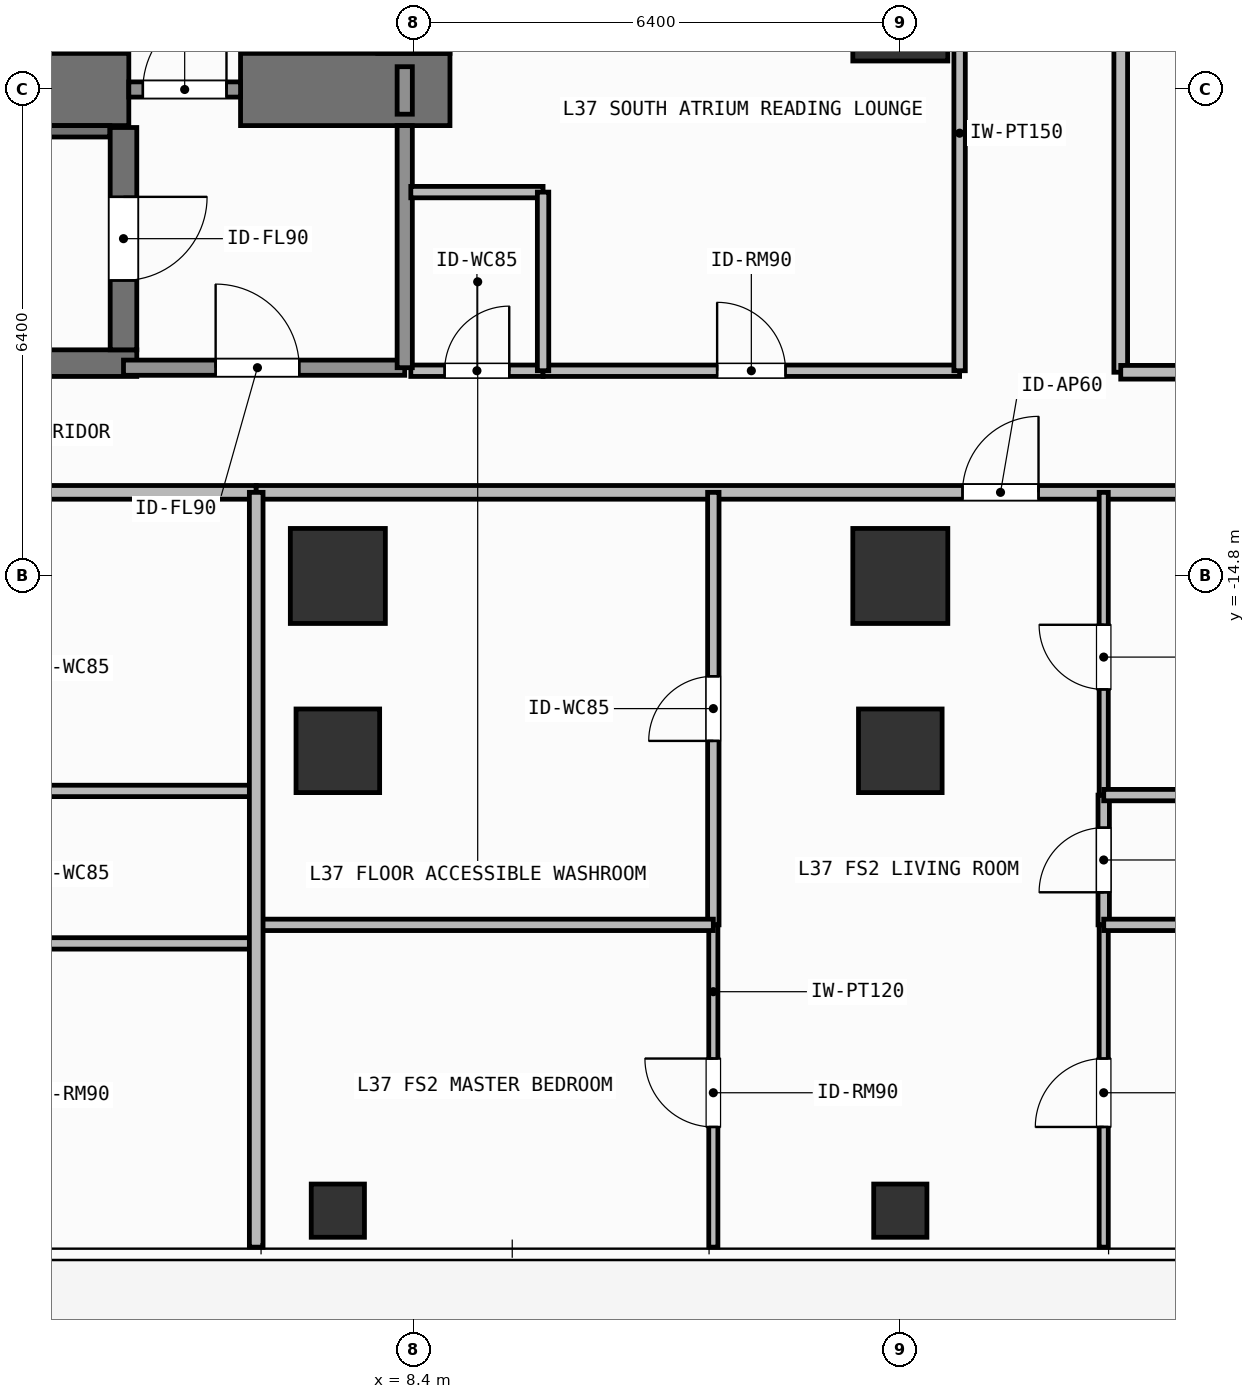
"""IFC4 building model, lengths in metres.
Left out: names, types, materials, properties, quantities, classifications, styles, units other than length and angle.
Written with IfcOpenShell. Run it as: python <this file> out.ifc"""

import sys

from ifc_helpers import new_model, si_unit, direction, frame, frame_2d, origin, origin_2d, place, context, subcontext, project, spatial, rectangle, hollow_rectangle, extrude, element, fill, save


model = new_model("IFC4")
c1 = context("Model", 3, precision=1e-05, world=origin(), true_north=direction((0.0, 1.0)))
c2 = subcontext(c1, "Body", "Model", "MODEL_VIEW")
j1 = project(units=[si_unit("LENGTHUNIT", "METRE"), si_unit("PLANEANGLEUNIT", "RADIAN")], contexts=[c1])
p1 = place(None, origin())
s1 = spatial("IfcSite", under=j1, at=p1, CompositionType="ELEMENT")
p2 = place(p1, origin())
s2 = spatial("IfcBuilding", under=s1, at=p2, CompositionType="ELEMENT")
p3 = place(p2, frame((0.0, 0.0, 148.5)))
s3 = spatial("IfcBuildingStorey", under=s2, at=p3, CompositionType="ELEMENT", Elevation=148.5)
p4 = place(p3, frame((-2.62, -8.4, 0.0), z_axis=(0.0, 0.0, 1.0), x_axis=(1.0, 0.0, 0.0)))
e1 = element("IfcWall", 1, at=p4, inside=s3, PredefinedType="SHEAR", context=c2, shape_type="SweptSolid", body=[
    extrude(rectangle(XDim=7.27, YDim=0.95, at=frame_2d((3.635, 0.0))), origin(), (0.0, 0.0, 1.0), 3.9),
])
p5 = place(p3, frame((6.12, -8.4, 0.0), z_axis=(0.0, 0.0, 1.0), x_axis=(1.0, 0.0, 0.0)))
e2 = element("IfcWall", 2, at=p5, inside=s3, PredefinedType="SHEAR", context=c2, shape_type="SweptSolid", body=[
    extrude(rectangle(XDim=2.755, YDim=0.95, at=frame_2d((1.377, 0.0))), origin(), (0.0, 0.0, 1.0), 3.9),
])
p6 = place(p3, frame((8.4, -7.925, 0.0), z_axis=(0.0, 0.0, 1.0), x_axis=(0.0, 1.0, 0.0)))
e3 = element("IfcWall", 3, at=p6, inside=s3, PredefinedType="SHEAR", context=c2, shape_type="SweptSolid", body=[
    extrude(rectangle(XDim=2.1, YDim=0.95, at=frame_2d((1.05, 0.0))), origin(), (0.0, 0.0, 1.0), 3.9),
])
p7 = place(p3, frame((-2.555, -12.0, 0.0), z_axis=(0.0, 0.0, 1.0), x_axis=(1.0, 0.0, 0.0)))
e4 = element("IfcWall", 4, at=p7, inside=s3, PredefinedType="SHEAR", context=c2, shape_type="SweptSolid", body=[
    extrude(rectangle(XDim=7.31, YDim=0.35, at=frame_2d((3.655, 0.0))), origin(), (0.0, 0.0, 1.0), 3.9),
])
p8 = place(p3, frame((-2.2, -8.95, 0.0), z_axis=(0.0, 0.0, 1.0), x_axis=(1.0, 0.0, 0.0)))
e5 = element("IfcWall", 5, at=p8, inside=s3, PredefinedType="SHEAR", context=c2, shape_type="SweptSolid", body=[
    extrude(rectangle(XDim=6.6, YDim=0.15, at=frame_2d((3.3, 0.0))), origin(), (0.0, 0.0, 1.0), 3.9),
])
p9 = place(p3, frame((4.58, -8.9, 0.0), z_axis=(0.0, 0.0, 1.0), x_axis=(0.0, -1.0, 0.0)))
e6 = element("IfcWall", 6, at=p9, inside=s3, PredefinedType="SHEAR", context=c2, shape_type="SweptSolid", body=[
    extrude(rectangle(XDim=2.925, YDim=0.35, at=frame_2d((1.462, 0.0))), origin(), (0.0, 0.0, 1.0), 3.9),
])
p10 = place(p9, frame((0.913, 0.0, 0.0)))
e7 = element("IfcOpeningElement", 7, at=p10, cuts=e6, PredefinedType="OPENING", context=c2, shape_type="SweptSolid", body=[
    extrude(rectangle(XDim=1.1, YDim=2.15, at=frame_2d((0.55, 1.075))), frame((0.0, 0.185, 0.0), z_axis=(0.0, -1.0, 0.0), x_axis=(1.0, 0.0, 0.0)), (0.0, 0.0, 1.0), 0.37),
])
for number, where, z_axis, x_axis in (
    (8, (7.4, -14.8, 0.0), (0.0, 0.0, 1.0), (1.0, 0.0, 0.0)),
    (9, (14.8, -14.8, 0.0), (0.0, 0.0, 1.0), (1.0, 0.0, 0.0)),
    (10, (14.8, -7.4, 0.0), (0.0, 0.0, 1.0), (1.0, 0.0, 0.0)),
):
    element("IfcColumn", number, at=place(p3, frame(where, z_axis=z_axis, x_axis=x_axis)), inside=s3, PredefinedType="COLUMN", context=c2, shape_type="SweptSolid", body=[
        extrude(rectangle(XDim=1.25, YDim=1.25, at=origin_2d()), origin(), (0.0, 0.0, 1.0), 3.9),
    ])
for number, where, z_axis, x_axis in (
    (11, (7.4, -17.1, 0.0), (0.0, 0.0, 1.0), (1.0, 0.0, 0.0)),
    (12, (14.8, -17.1, 0.0), (0.0, 0.0, 1.0), (1.0, 0.0, 0.0)),
):
    element("IfcColumn", number, at=place(p3, frame(where, z_axis=z_axis, x_axis=x_axis)), inside=s3, PredefinedType="COLUMN", context=c2, shape_type="SweptSolid", body=[
        extrude(rectangle(XDim=1.1, YDim=1.1, at=origin_2d()), origin(), (0.0, 0.0, 1.0), 3.9),
    ])
for number, where, z_axis, x_axis in (
    (13, (7.4, -23.15, 0.0), (0.0, 0.0, 1.0), (1.0, 0.0, 0.0)),
    (14, (14.8, -23.15, 0.0), (0.0, 0.0, 1.0), (1.0, 0.0, 0.0)),
):
    element("IfcColumn", number, at=place(p3, frame(where, z_axis=z_axis, x_axis=x_axis)), inside=s3, PredefinedType="COLUMN", context=c2, shape_type="SweptSolid", body=[
        extrude(hollow_rectangle(XDim=0.7, YDim=0.7, WallThickness=0.032, at=origin_2d()), origin(), (0.0, 0.0, 1.0), 3.9),
    ])
p11 = place(p3, frame((4.58, -12.06, 0.0), z_axis=(0.0, 0.0, 1.0), x_axis=(1.0, 0.0, 0.0)))
e15 = element("IfcWall", 15, at=p11, inside=s3, PredefinedType="SOLIDWALL", context=c2, shape_type="SweptSolid", body=[
    extrude(rectangle(XDim=3.7, YDim=0.2, at=frame_2d((1.85, 0.0))), origin(), (0.0, 0.0, 1.0), 3.68),
])
p12 = place(p11, frame((1.212, 0.0, 0.0)))
e16 = element("IfcOpeningElement", 16, at=p12, cuts=e15, PredefinedType="OPENING", context=c2, shape_type="SweptSolid", body=[
    extrude(rectangle(XDim=1.1, YDim=2.15, at=frame_2d((0.55, 1.075))), frame((0.0, 0.11, 0.0), z_axis=(0.0, -1.0, 0.0), x_axis=(1.0, 0.0, 0.0)), (0.0, 0.0, 1.0), 0.22),
])
p13 = place(p3, frame((4.65, -8.4, 0.0), z_axis=(0.0, 0.0, 1.0), x_axis=(1.0, 0.0, 0.0)))
e17 = element("IfcWall", 17, at=p13, inside=s3, PredefinedType="SOLIDWALL", context=c2, shape_type="SweptSolid", body=[
    extrude(rectangle(XDim=1.47, YDim=0.2, at=frame_2d((0.735, 0.0))), origin(), (0.0, 0.0, 1.0), 2.72),
])
p14 = place(p13, frame((0.185, 0.0, 0.0)))
e18 = element("IfcOpeningElement", 18, at=p14, cuts=e17, PredefinedType="OPENING", context=c2, shape_type="SweptSolid", body=[
    extrude(rectangle(XDim=1.1, YDim=2.15, at=frame_2d((0.55, 1.075))), frame((0.0, 0.11, 0.0), z_axis=(0.0, -1.0, 0.0), x_axis=(1.0, 0.0, 0.0)), (0.0, 0.0, 1.0), 0.22),
])
p15 = place(p3, frame((8.36, -12.1, 0.0), z_axis=(0.0, 0.0, 1.0), x_axis=(1.0, 0.0, 0.0)))
e19 = element("IfcWall", 19, at=p15, inside=s3, PredefinedType="PARTITIONING", context=c2, shape_type="SweptSolid", body=[
    extrude(rectangle(XDim=1.74, YDim=0.15, at=frame_2d((0.87, 0.0))), origin(), (0.0, 0.0, 1.0), 3.68),
])
p16 = place(p15, frame((0.445, 0.0, 0.0)))
e20 = element("IfcOpeningElement", 20, at=p16, cuts=e19, PredefinedType="OPENING", context=c2, shape_type="SweptSolid", body=[
    extrude(rectangle(XDim=0.85, YDim=2.1, at=frame_2d((0.425, 1.05))), frame((0.0, 0.085, 0.0), z_axis=(0.0, -1.0, 0.0), x_axis=(1.0, 0.0, 0.0)), (0.0, 0.0, 1.0), 0.17),
])
p17 = place(p3, frame((10.1, -12.1, 0.0), z_axis=(0.0, 0.0, 1.0), x_axis=(1.0, 0.0, 0.0)))
e21 = element("IfcWall", 21, at=p17, inside=s3, PredefinedType="PARTITIONING", context=c2, shape_type="SweptSolid", body=[
    extrude(rectangle(XDim=5.48, YDim=0.15, at=frame_2d((2.74, 0.0))), origin(), (0.0, 0.0, 1.0), 3.68),
])
p18 = place(p17, frame((2.29, 0.0, 0.0)))
e22 = element("IfcOpeningElement", 22, at=p18, cuts=e21, PredefinedType="OPENING", context=c2, shape_type="SweptSolid", body=[
    extrude(rectangle(XDim=0.9, YDim=2.1, at=frame_2d((0.45, 1.05))), frame((0.0, 0.085, 0.0), z_axis=(0.0, -1.0, 0.0), x_axis=(1.0, 0.0, 0.0)), (0.0, 0.0, 1.0), 0.17),
])
p19 = place(p3, frame((-16.32, -13.7, 0.0), z_axis=(0.0, 0.0, 1.0), x_axis=(1.0, 0.0, 0.0)))
e23 = element("IfcWall", 23, at=p19, inside=s3, PredefinedType="PARTITIONING", context=c2, shape_type="SweptSolid", body=[
    extrude(rectangle(XDim=22.646, YDim=0.18, at=frame_2d((11.323, 0.0))), origin(), (0.0, 0.0, 1.0), 3.68),
])
p20 = place(p19, frame((11.271, 0.0, 0.0)))
e24 = element("IfcOpeningElement", 24, at=p20, cuts=e23, PredefinedType="OPENING", context=c2, shape_type="SweptSolid", body=[
    extrude(rectangle(XDim=1.0, YDim=2.2, at=frame_2d((0.5, 1.1))), frame((0.0, 0.1, 0.0), z_axis=(0.0, -1.0, 0.0), x_axis=(1.0, 0.0, 0.0)), (0.0, 0.0, 1.0), 0.2),
])
p21 = place(p3, frame((6.326, -13.7, 0.0), z_axis=(0.0, 0.0, 1.0), x_axis=(1.0, 0.0, 0.0)))
e25 = element("IfcWall", 25, at=p21, inside=s3, PredefinedType="PARTITIONING", context=c2, shape_type="SweptSolid", body=[
    extrude(rectangle(XDim=17.794, YDim=0.18, at=frame_2d((8.897, 0.0))), origin(), (0.0, 0.0, 1.0), 3.68),
])
p22 = place(p21, frame((9.292, 0.0, 0.0)))
e26 = element("IfcOpeningElement", 26, at=p22, cuts=e25, PredefinedType="OPENING", context=c2, shape_type="SweptSolid", body=[
    extrude(rectangle(XDim=1.0, YDim=2.2, at=frame_2d((0.5, 1.1))), frame((0.0, 0.1, 0.0), z_axis=(0.0, -1.0, 0.0), x_axis=(1.0, 0.0, 0.0)), (0.0, 0.0, 1.0), 0.2),
])
p23 = place(p3, frame((12.34, -19.39, 0.0), z_axis=(0.0, 0.0, 1.0), x_axis=(0.0, 1.0, 0.0)))
e27 = element("IfcWall", 27, at=p23, inside=s3, PredefinedType="PARTITIONING", context=c2, shape_type="SweptSolid", body=[
    extrude(rectangle(XDim=5.69, YDim=0.15, at=frame_2d((2.845, 0.0))), origin(), (0.0, 0.0, 1.0), 3.68),
])
p24 = place(p23, frame((2.42, 0.0, 0.0)))
e28 = element("IfcOpeningElement", 28, at=p24, cuts=e27, PredefinedType="OPENING", context=c2, shape_type="SweptSolid", body=[
    extrude(rectangle(XDim=0.85, YDim=2.1, at=frame_2d((0.425, 1.05))), frame((0.0, 0.085, 0.0), z_axis=(0.0, -1.0, 0.0), x_axis=(1.0, 0.0, 0.0)), (0.0, 0.0, 1.0), 0.17),
])
p25 = place(p3, frame((12.34, -23.63, 0.0), z_axis=(0.0, 0.0, 1.0), x_axis=(0.0, 1.0, 0.0)))
e29 = element("IfcWall", 29, at=p25, inside=s3, PredefinedType="PARTITIONING", context=c2, shape_type="SweptSolid", body=[
    extrude(rectangle(XDim=4.24, YDim=0.12, at=frame_2d((2.12, 0.0))), origin(), (0.0, 0.0, 1.0), 3.68),
])
p26 = place(p25, frame((1.581, 0.0, 0.0)))
e30 = element("IfcOpeningElement", 30, at=p26, cuts=e29, PredefinedType="OPENING", context=c2, shape_type="SweptSolid", body=[
    extrude(rectangle(XDim=0.9, YDim=2.1, at=frame_2d((0.45, 1.05))), frame((0.0, 0.07, 0.0), z_axis=(0.0, -1.0, 0.0), x_axis=(1.0, 0.0, 0.0)), (0.0, 0.0, 1.0), 0.14),
])
p27 = place(p3, frame((17.476, -19.39, 0.0), z_axis=(0.0, 0.0, 1.0), x_axis=(0.0, 1.0, 0.0)))
e31 = element("IfcWall", 31, at=p27, inside=s3, PredefinedType="PARTITIONING", context=c2, shape_type="SweptSolid", body=[
    extrude(rectangle(XDim=1.707, YDim=0.15, at=frame_2d((0.854, 0.0))), origin(), (0.0, 0.0, 1.0), 3.68),
])
p28 = place(p27, frame((0.428, 0.0, 0.0)))
e32 = element("IfcOpeningElement", 32, at=p28, cuts=e31, PredefinedType="OPENING", context=c2, shape_type="SweptSolid", body=[
    extrude(rectangle(XDim=0.85, YDim=2.1, at=frame_2d((0.425, 1.05))), frame((0.0, 0.085, 0.0), z_axis=(0.0, -1.0, 0.0), x_axis=(1.0, 0.0, 0.0)), (0.0, 0.0, 1.0), 0.17),
])
p29 = place(p3, frame((17.476, -17.683, 0.0), z_axis=(0.0, 0.0, 1.0), x_axis=(0.0, 1.0, 0.0)))
e33 = element("IfcWall", 33, at=p29, inside=s3, PredefinedType="PARTITIONING", context=c2, shape_type="SweptSolid", body=[
    extrude(rectangle(XDim=3.983, YDim=0.12, at=frame_2d((1.992, 0.0))), origin(), (0.0, 0.0, 1.0), 3.68),
])
p30 = place(p29, frame((1.391, 0.0, 0.0)))
e34 = element("IfcOpeningElement", 34, at=p30, cuts=e33, PredefinedType="OPENING", context=c2, shape_type="SweptSolid", body=[
    extrude(rectangle(XDim=0.85, YDim=2.1, at=frame_2d((0.425, 1.05))), frame((0.0, 0.07, 0.0), z_axis=(0.0, -1.0, 0.0), x_axis=(1.0, 0.0, 0.0)), (0.0, 0.0, 1.0), 0.14),
])
p31 = place(p3, frame((17.476, -23.63, 0.0), z_axis=(0.0, 0.0, 1.0), x_axis=(0.0, 1.0, 0.0)))
e35 = element("IfcWall", 35, at=p31, inside=s3, PredefinedType="PARTITIONING", context=c2, shape_type="SweptSolid", body=[
    extrude(rectangle(XDim=4.24, YDim=0.12, at=frame_2d((2.12, 0.0))), origin(), (0.0, 0.0, 1.0), 3.68),
])
p32 = place(p31, frame((1.581, 0.0, 0.0)))
e36 = element("IfcOpeningElement", 36, at=p32, cuts=e35, PredefinedType="OPENING", context=c2, shape_type="SweptSolid", body=[
    extrude(rectangle(XDim=0.9, YDim=2.1, at=frame_2d((0.45, 1.05))), frame((0.0, 0.07, 0.0), z_axis=(0.0, -1.0, 0.0), x_axis=(1.0, 0.0, 0.0)), (0.0, 0.0, 1.0), 0.14),
])
p33 = place(p3, frame((17.7, -12.12, 0.0), z_axis=(0.0, 0.0, 1.0), x_axis=(0.0, 1.0, 0.0)))
e37 = element("IfcWall", 37, at=p33, inside=s3, PredefinedType="PARTITIONING", context=c2, shape_type="SweptSolid", body=[
    extrude(rectangle(XDim=24.24, YDim=0.18, at=frame_2d((12.12, 0.0))), origin(), (0.0, 0.0, 1.0), 3.68),
])
p34 = place(p33, frame((11.62, 0.0, 0.0)))
e38 = element("IfcOpeningElement", 38, at=p34, cuts=e37, PredefinedType="OPENING", context=c2, shape_type="SweptSolid", body=[
    extrude(rectangle(XDim=1.0, YDim=2.2, at=frame_2d((0.5, 1.1))), frame((0.0, 0.1, 0.0), z_axis=(0.0, -1.0, 0.0), x_axis=(1.0, 0.0, 0.0)), (0.0, 0.0, 1.0), 0.2),
])
p35 = place(p3, frame((8.28, -12.06, 0.0), z_axis=(0.0, 0.0, 1.0), x_axis=(0.0, 1.0, 0.0)))
e39 = element("IfcWall", 39, at=p35, inside=s3, PredefinedType="SOLIDWALL", context=c2, shape_type="SweptSolid", body=[
    extrude(rectangle(XDim=3.185, YDim=0.2, at=frame_2d((1.593, 0.0))), origin(), (0.0, 0.0, 1.0), 3.68),
])
p36 = place(p3, frame((8.28, -8.725, 0.0), z_axis=(0.0, 0.0, 1.0), x_axis=(0.0, 1.0, 0.0)))
e40 = element("IfcWall", 40, at=p36, inside=s3, PredefinedType="SOLIDWALL", context=c2, shape_type="SweptSolid", body=[
    extrude(rectangle(XDim=0.625, YDim=0.2, at=frame_2d((0.312, 0.0))), origin(), (0.0, 0.0, 1.0), 3.68),
])
p37 = place(p3, frame((8.36, -9.75, 0.0), z_axis=(0.0, 0.0, 1.0), x_axis=(1.0, 0.0, 0.0)))
e41 = element("IfcWall", 41, at=p37, inside=s3, PredefinedType="PARTITIONING", context=c2, shape_type="SweptSolid", body=[
    extrude(rectangle(XDim=1.74, YDim=0.15, at=frame_2d((0.87, 0.0))), origin(), (0.0, 0.0, 1.0), 3.68),
])
p38 = place(p3, frame((10.1, -12.1, 0.0), z_axis=(0.0, 0.0, 1.0), x_axis=(0.0, 1.0, 0.0)))
e42 = element("IfcWall", 42, at=p38, inside=s3, PredefinedType="PARTITIONING", context=c2, shape_type="SweptSolid", body=[
    extrude(rectangle(XDim=2.35, YDim=0.15, at=frame_2d((1.175, 0.0))), origin(), (0.0, 0.0, 1.0), 3.68),
])
p39 = place(p3, frame((15.58, -12.1, 0.0), z_axis=(0.0, 0.0, 1.0), x_axis=(0.0, 1.0, 0.0)))
e43 = element("IfcWall", 43, at=p39, inside=s3, PredefinedType="PARTITIONING", context=c2, shape_type="SweptSolid", body=[
    extrude(rectangle(XDim=6.25, YDim=0.15, at=frame_2d((3.125, 0.0))), origin(), (0.0, 0.0, 1.0), 3.68),
])
for number, where, z_axis, x_axis in (
    (44, (1.964, -17.628, 0.0), (0.0, 0.0, 1.0), (1.0, 0.0, 0.0)),
    (45, (1.964, -19.634, 0.0), (0.0, 0.0, 1.0), (1.0, 0.0, 0.0)),
):
    element("IfcWall", number, at=place(p3, frame(where, z_axis=z_axis, x_axis=x_axis)), inside=s3, PredefinedType="PARTITIONING", context=c2, shape_type="SweptSolid", body=[
        extrude(rectangle(XDim=4.362, YDim=0.15, at=frame_2d((2.181, 0.0))), origin(), (0.0, 0.0, 1.0), 3.68),
    ])
p40 = place(p3, frame((6.326, -19.39, 0.0), z_axis=(0.0, 0.0, 1.0), x_axis=(1.0, 0.0, 0.0)))
e46 = element("IfcWall", 46, at=p40, inside=s3, PredefinedType="PARTITIONING", context=c2, shape_type="SweptSolid", body=[
    extrude(rectangle(XDim=6.014, YDim=0.15, at=frame_2d((3.007, 0.0))), origin(), (0.0, 0.0, 1.0), 3.68),
])
for number, where, z_axis, x_axis in (
    (47, (17.476, -17.683, 0.0), (0.0, 0.0, 1.0), (1.0, 0.0, 0.0)),
    (48, (17.476, -19.39, 0.0), (0.0, 0.0, 1.0), (1.0, 0.0, 0.0)),
):
    element("IfcWall", number, at=place(p3, frame(where, z_axis=z_axis, x_axis=x_axis)), inside=s3, PredefinedType="PARTITIONING", context=c2, shape_type="SweptSolid", body=[
        extrude(rectangle(XDim=6.644, YDim=0.15, at=frame_2d((3.322, 0.0))), origin(), (0.0, 0.0, 1.0), 3.68),
    ])
p41 = place(p3, frame((6.326, -23.63, 0.0), z_axis=(0.0, 0.0, 1.0), x_axis=(0.0, 1.0, 0.0)))
e49 = element("IfcWall", 49, at=p41, inside=s3, PredefinedType="PARTITIONING", context=c2, shape_type="SweptSolid", body=[
    extrude(rectangle(XDim=9.93, YDim=0.18, at=frame_2d((4.965, 0.0))), origin(), (0.0, 0.0, 1.0), 3.68),
])
p42 = place(p3, frame((17.7, -12.12, 0.0), z_axis=(0.0, 0.0, 1.0), x_axis=(1.0, 0.0, 0.0)))
e50 = element("IfcWall", 50, at=p42, inside=s3, PredefinedType="PARTITIONING", context=c2, shape_type="SweptSolid", body=[
    extrude(rectangle(XDim=9.83, YDim=0.18, at=frame_2d((4.915, 0.0))), origin(), (0.0, 0.0, 1.0), 3.68),
])
p43 = place(p10, origin())
e51 = element("IfcDoor", 51, at=p43, inside=s3, OperationType="SINGLE_SWING_LEFT", PredefinedType="DOOR", context=c2, shape_type="SweptSolid", body=[
    extrude(rectangle(XDim=1.1, YDim=2.15, at=frame_2d((0.55, 1.075))), frame((0.0, 0.025, 0.0), z_axis=(0.0, -1.0, 0.0), x_axis=(1.0, 0.0, 0.0)), (0.0, 0.0, 1.0), 0.05),
])
fill(e7, e51)
p44 = place(p12, origin())
e52 = element("IfcDoor", 52, at=p44, inside=s3, OperationType="SINGLE_SWING_LEFT", PredefinedType="DOOR", context=c2, shape_type="SweptSolid", body=[
    extrude(rectangle(XDim=1.1, YDim=2.15, at=frame_2d((0.55, 1.075))), frame((0.0, 0.025, 0.0), z_axis=(0.0, -1.0, 0.0), x_axis=(1.0, 0.0, 0.0)), (0.0, 0.0, 1.0), 0.05),
])
fill(e16, e52)
p45 = place(p14, origin())
e53 = element("IfcDoor", 53, at=p45, inside=s3, OperationType="SINGLE_SWING_RIGHT", PredefinedType="DOOR", context=c2, shape_type="SweptSolid", body=[
    extrude(rectangle(XDim=1.1, YDim=2.15, at=frame_2d((0.55, 1.075))), frame((0.0, 0.025, 0.0), z_axis=(0.0, -1.0, 0.0), x_axis=(1.0, 0.0, 0.0)), (0.0, 0.0, 1.0), 0.05),
])
fill(e18, e53)
p46 = place(p16, origin())
e54 = element("IfcDoor", 54, at=p46, inside=s3, OperationType="SINGLE_SWING_RIGHT", PredefinedType="DOOR", context=c2, shape_type="SweptSolid", body=[
    extrude(rectangle(XDim=0.85, YDim=2.1, at=frame_2d((0.425, 1.05))), frame((0.0, 0.025, 0.0), z_axis=(0.0, -1.0, 0.0), x_axis=(1.0, 0.0, 0.0)), (0.0, 0.0, 1.0), 0.05),
])
fill(e20, e54)
p47 = place(p18, origin())
e55 = element("IfcDoor", 55, at=p47, inside=s3, OperationType="SINGLE_SWING_LEFT", PredefinedType="DOOR", context=c2, shape_type="SweptSolid", body=[
    extrude(rectangle(XDim=0.9, YDim=2.1, at=frame_2d((0.45, 1.05))), frame((0.0, 0.025, 0.0), z_axis=(0.0, -1.0, 0.0), x_axis=(1.0, 0.0, 0.0)), (0.0, 0.0, 1.0), 0.05),
])
fill(e22, e55)
p48 = place(p22, origin())
e56 = element("IfcDoor", 56, at=p48, inside=s3, OperationType="SINGLE_SWING_RIGHT", PredefinedType="DOOR", context=c2, shape_type="SweptSolid", body=[
    extrude(rectangle(XDim=1.0, YDim=2.2, at=frame_2d((0.5, 1.1))), frame((0.0, 0.025, 0.0), z_axis=(0.0, -1.0, 0.0), x_axis=(1.0, 0.0, 0.0)), (0.0, 0.0, 1.0), 0.05),
])
fill(e26, e56)
p49 = place(p24, origin())
e57 = element("IfcDoor", 57, at=p49, inside=s3, OperationType="SINGLE_SWING_LEFT", PredefinedType="DOOR", context=c2, shape_type="SweptSolid", body=[
    extrude(rectangle(XDim=0.85, YDim=2.1, at=frame_2d((0.425, 1.05))), frame((0.0, 0.025, 0.0), z_axis=(0.0, -1.0, 0.0), x_axis=(1.0, 0.0, 0.0)), (0.0, 0.0, 1.0), 0.05),
])
fill(e28, e57)
p50 = place(p26, origin())
e58 = element("IfcDoor", 58, at=p50, inside=s3, OperationType="SINGLE_SWING_RIGHT", PredefinedType="DOOR", context=c2, shape_type="SweptSolid", body=[
    extrude(rectangle(XDim=0.9, YDim=2.1, at=frame_2d((0.45, 1.05))), frame((0.0, 0.025, 0.0), z_axis=(0.0, -1.0, 0.0), x_axis=(1.0, 0.0, 0.0)), (0.0, 0.0, 1.0), 0.05),
])
fill(e30, e58)
p51 = place(p28, origin())
e59 = element("IfcDoor", 59, at=p51, inside=s3, OperationType="SINGLE_SWING_LEFT", PredefinedType="DOOR", context=c2, shape_type="SweptSolid", body=[
    extrude(rectangle(XDim=0.85, YDim=2.1, at=frame_2d((0.425, 1.05))), frame((0.0, 0.025, 0.0), z_axis=(0.0, -1.0, 0.0), x_axis=(1.0, 0.0, 0.0)), (0.0, 0.0, 1.0), 0.05),
])
fill(e32, e59)
p52 = place(p30, origin())
e60 = element("IfcDoor", 60, at=p52, inside=s3, OperationType="SINGLE_SWING_RIGHT", PredefinedType="DOOR", context=c2, shape_type="SweptSolid", body=[
    extrude(rectangle(XDim=0.85, YDim=2.1, at=frame_2d((0.425, 1.05))), frame((0.0, 0.025, 0.0), z_axis=(0.0, -1.0, 0.0), x_axis=(1.0, 0.0, 0.0)), (0.0, 0.0, 1.0), 0.05),
])
fill(e34, e60)
p53 = place(p32, origin())
e61 = element("IfcDoor", 61, at=p53, inside=s3, OperationType="SINGLE_SWING_LEFT", PredefinedType="DOOR", context=c2, shape_type="SweptSolid", body=[
    extrude(rectangle(XDim=0.9, YDim=2.1, at=frame_2d((0.45, 1.05))), frame((0.0, 0.025, 0.0), z_axis=(0.0, -1.0, 0.0), x_axis=(1.0, 0.0, 0.0)), (0.0, 0.0, 1.0), 0.05),
])
fill(e36, e61)
save(model, sys.argv[1])
